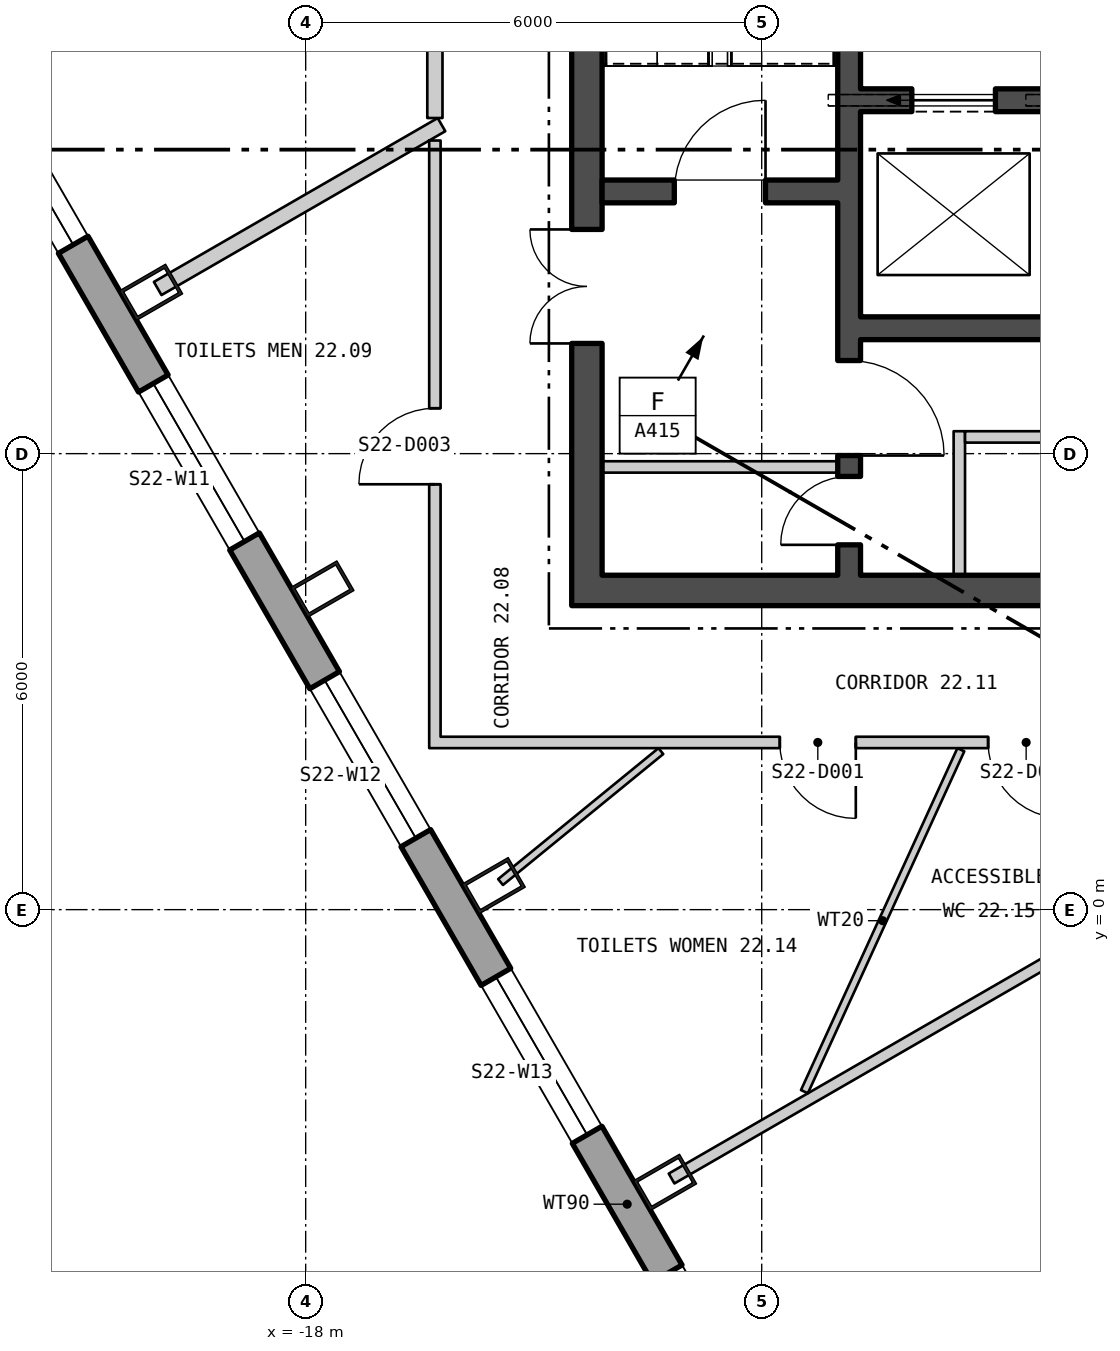
"""IFC4 building model, lengths in metres.
Left out: names, types, materials, properties, quantities, classifications, styles, units other than length and angle.
Written with IfcOpenShell. Run it as: python <this file> out.ifc"""

import sys

from ifc_helpers import new_model, si_unit, direction, frame, frame_2d, origin, origin_2d, place, context, subcontext, project, spatial, polyline, rectangle, hollow_rectangle, outline, extrude, element, fill, save


model = new_model("IFC4")
c1 = context("Model", 3, precision=1e-05, world=origin(), true_north=direction((0.0, 1.0)))
c2 = subcontext(c1, "Body", "Model", "MODEL_VIEW")
j1 = project(units=[si_unit("LENGTHUNIT", "METRE"), si_unit("PLANEANGLEUNIT", "RADIAN")], contexts=[c1])
p1 = place(None, origin())
s1 = spatial("IfcSite", under=j1, at=p1, CompositionType="ELEMENT")
p2 = place(p1, origin())
s2 = spatial("IfcBuilding", under=s1, at=p2, CompositionType="ELEMENT")
p3 = place(p2, frame((0.0, 0.0, 298.2)))
s3 = spatial("IfcBuildingStorey", under=s2, at=p3, CompositionType="ELEMENT", Elevation=298.2)
for number, where, z_axis, x_axis in (
    (1, (-20.034, 8.123, 0.0), (0.0, 0.0, 1.0), (0.5, -0.866, 0.0)),
    (2, (-17.78, 4.219, 0.0), (0.0, 0.0, 1.0), (0.5, -0.866, 0.0)),
    (3, (-15.526, 0.316, 0.0), (0.0, 0.0, 1.0), (0.5, -0.866, 0.0)),
    (4, (-13.272, -3.588, 0.0), (0.0, 0.0, 1.0), (0.5, -0.866, 0.0)),
):
    element("IfcColumn", number, at=place(p3, frame(where, z_axis=z_axis, x_axis=x_axis)), inside=s3, PredefinedType="COLUMN", context=c2, shape_type="SweptSolid", body=[
        extrude(hollow_rectangle(XDim=0.45, YDim=0.7, WallThickness=0.04, at=origin_2d()), origin(), (0.0, 0.0, 1.0), 6.0),
    ])
p4 = place(p3, frame((-25.205, 15.931, -0.28), z_axis=(0.0, 0.0, 1.0), x_axis=(0.499999764979, -0.866025539474, 0.0)))
e5 = element("IfcWall", 5, at=p4, inside=s3, PredefinedType="SOLIDWALL", context=c2, shape_type="SweptSolid", body=[
    extrude(outline(polyline([(-0.13, -0.225), (45.87, -0.225), (45.61, 0.225), (0.13, 0.225), (-0.13, -0.225)])), origin(), (0.0, 0.0, 1.0), 6.1),
])
p5 = place(p4, frame((1.424, 0.0, 1.18)))
e6 = element("IfcOpeningElement", 6, at=p5, cuts=e5, PredefinedType="OPENING", context=c2, shape_type="SweptSolid", body=[
    extrude(rectangle(XDim=2.4, YDim=4.1, at=frame_2d((1.2, 2.05))), frame((0.0, 0.235, 0.0), z_axis=(0.0, -1.0, 0.0), x_axis=(1.0, 0.0, 0.0)), (0.0, 0.0, 1.0), 0.47),
])
p6 = place(p4, frame((5.893, 0.0, 1.18)))
e7 = element("IfcOpeningElement", 7, at=p6, cuts=e5, PredefinedType="OPENING", context=c2, shape_type="SweptSolid", body=[
    extrude(rectangle(XDim=2.4, YDim=4.1, at=frame_2d((1.2, 2.05))), frame((0.0, 0.235, 0.0), z_axis=(0.0, -1.0, 0.0), x_axis=(1.0, 0.0, 0.0)), (0.0, 0.0, 1.0), 0.47),
])
p7 = place(p4, frame((10.401, 0.0, 1.18)))
e8 = element("IfcOpeningElement", 8, at=p7, cuts=e5, PredefinedType="OPENING", context=c2, shape_type="SweptSolid", body=[
    extrude(rectangle(XDim=2.4, YDim=4.1, at=frame_2d((1.2, 2.05))), frame((0.0, 0.235, 0.0), z_axis=(0.0, -1.0, 0.0), x_axis=(1.0, 0.0, 0.0)), (0.0, 0.0, 1.0), 0.47),
])
p8 = place(p4, frame((14.909, 0.0, 1.18)))
e9 = element("IfcOpeningElement", 9, at=p8, cuts=e5, PredefinedType="OPENING", context=c2, shape_type="SweptSolid", body=[
    extrude(rectangle(XDim=2.4, YDim=4.1, at=frame_2d((1.2, 2.05))), frame((0.0, 0.235, 0.0), z_axis=(0.0, -1.0, 0.0), x_axis=(1.0, 0.0, 0.0)), (0.0, 0.0, 1.0), 0.47),
])
p9 = place(p4, frame((19.416, 0.0, 1.18)))
e10 = element("IfcOpeningElement", 10, at=p9, cuts=e5, PredefinedType="OPENING", context=c2, shape_type="SweptSolid", body=[
    extrude(rectangle(XDim=2.4, YDim=4.1, at=frame_2d((1.2, 2.05))), frame((0.0, 0.235, 0.0), z_axis=(0.0, -1.0, 0.0), x_axis=(1.0, 0.0, 0.0)), (0.0, 0.0, 1.0), 0.47),
])
p10 = place(p4, frame((23.924, 0.0, 1.18)))
e11 = element("IfcOpeningElement", 11, at=p10, cuts=e5, PredefinedType="OPENING", context=c2, shape_type="SweptSolid", body=[
    extrude(rectangle(XDim=2.4, YDim=4.1, at=frame_2d((1.2, 2.05))), frame((0.0, 0.235, 0.0), z_axis=(0.0, -1.0, 0.0), x_axis=(1.0, 0.0, 0.0)), (0.0, 0.0, 1.0), 0.47),
])
p11 = place(p4, frame((28.431, 0.0, 1.18)))
e12 = element("IfcOpeningElement", 12, at=p11, cuts=e5, PredefinedType="OPENING", context=c2, shape_type="SweptSolid", body=[
    extrude(rectangle(XDim=2.4, YDim=4.1, at=frame_2d((1.2, 2.05))), frame((0.0, 0.235, 0.0), z_axis=(0.0, -1.0, 0.0), x_axis=(1.0, 0.0, 0.0)), (0.0, 0.0, 1.0), 0.47),
])
p12 = place(p4, frame((32.939, 0.0, 1.18)))
e13 = element("IfcOpeningElement", 13, at=p12, cuts=e5, PredefinedType="OPENING", context=c2, shape_type="SweptSolid", body=[
    extrude(rectangle(XDim=2.4, YDim=4.1, at=frame_2d((1.2, 2.05))), frame((0.0, 0.235, 0.0), z_axis=(0.0, -1.0, 0.0), x_axis=(1.0, 0.0, 0.0)), (0.0, 0.0, 1.0), 0.47),
])
p13 = place(p4, frame((37.447, 0.0, 1.18)))
e14 = element("IfcOpeningElement", 14, at=p13, cuts=e5, PredefinedType="OPENING", context=c2, shape_type="SweptSolid", body=[
    extrude(rectangle(XDim=2.4, YDim=4.1, at=frame_2d((1.2, 2.05))), frame((0.0, 0.235, 0.0), z_axis=(0.0, -1.0, 0.0), x_axis=(1.0, 0.0, 0.0)), (0.0, 0.0, 1.0), 0.47),
])
p14 = place(p4, frame((41.916, 0.0, 1.18)))
e15 = element("IfcOpeningElement", 15, at=p14, cuts=e5, PredefinedType="OPENING", context=c2, shape_type="SweptSolid", body=[
    extrude(rectangle(XDim=2.4, YDim=4.1, at=frame_2d((1.2, 2.05))), frame((0.0, 0.235, 0.0), z_axis=(0.0, -1.0, 0.0), x_axis=(1.0, 0.0, 0.0)), (0.0, 0.0, 1.0), 0.47),
])
p15 = place(p3, frame((-14.5, 4.2, 0.0), z_axis=(0.0, 0.0, 1.0), x_axis=(1.0, 0.0, 0.0)))
e16 = element("IfcWall", 16, at=p15, inside=s3, PredefinedType="SHEAR", context=c2, shape_type="SweptSolid", body=[
    extrude(rectangle(XDim=29.0, YDim=0.4, at=frame_2d((14.5, 0.0))), origin(), (0.0, 0.0, 1.0), 5.8),
])
p16 = place(p15, frame((9.0, 0.0, 0.0)))
e17 = element("IfcOpeningElement", 17, at=p16, cuts=e16, PredefinedType="OPENING", context=c2, shape_type="SweptSolid", body=[
    extrude(rectangle(XDim=1.8, YDim=2.4, at=frame_2d((0.9, 1.2))), frame((0.0, 0.21, 0.0), z_axis=(0.0, -1.0, 0.0), x_axis=(1.0, 0.0, 0.0)), (0.0, 0.0, 1.0), 0.42),
])
p17 = place(p15, frame((19.0, 0.0, 0.0)))
e18 = element("IfcOpeningElement", 18, at=p17, cuts=e16, PredefinedType="OPENING", context=c2, shape_type="SweptSolid", body=[
    extrude(rectangle(XDim=1.8, YDim=2.4, at=frame_2d((0.9, 1.2))), frame((0.0, 0.21, 0.0), z_axis=(0.0, -1.0, 0.0), x_axis=(1.0, 0.0, 0.0)), (0.0, 0.0, 1.0), 0.42),
])
p18 = place(p3, frame((-14.3, 4.4, 0.0), z_axis=(0.0, 0.0, 1.0), x_axis=(0.0, 1.0, 0.0)))
e19 = element("IfcWall", 19, at=p18, inside=s3, PredefinedType="SHEAR", context=c2, shape_type="SweptSolid", body=[
    extrude(rectangle(XDim=13.2, YDim=0.4, at=frame_2d((6.6, 0.0))), origin(), (0.0, 0.0, 1.0), 5.8),
])
p19 = place(p18, frame((3.05, 0.0, 0.0)))
e20 = element("IfcOpeningElement", 20, at=p19, cuts=e19, PredefinedType="OPENING", context=c2, shape_type="SweptSolid", body=[
    extrude(rectangle(XDim=1.5, YDim=2.1, at=frame_2d((0.75, 1.05))), frame((0.0, 0.21, 0.0), z_axis=(0.0, -1.0, 0.0), x_axis=(1.0, 0.0, 0.0)), (0.0, 0.0, 1.0), 0.42),
])
p20 = place(p3, frame((-10.85, 4.4, 0.0), z_axis=(0.0, 0.0, 1.0), x_axis=(0.0, 1.0, 0.0)))
e21 = element("IfcWall", 21, at=p20, inside=s3, PredefinedType="SHEAR", context=c2, shape_type="SweptSolid", body=[
    extrude(rectangle(XDim=13.2, YDim=0.3, at=frame_2d((6.6, 0.0))), origin(), (0.0, 0.0, 1.0), 5.8),
])
p21 = place(p20, frame((1.575, 0.0, 0.0)))
e22 = element("IfcOpeningElement", 22, at=p21, cuts=e21, PredefinedType="OPENING", context=c2, shape_type="SweptSolid", body=[
    extrude(rectangle(XDim=1.25, YDim=2.1, at=frame_2d((0.625, 1.05))), frame((0.0, 0.16, 0.0), z_axis=(0.0, -1.0, 0.0), x_axis=(1.0, 0.0, 0.0)), (0.0, 0.0, 1.0), 0.32),
])
p22 = place(p20, frame((0.4, 0.0, 0.0)))
e23 = element("IfcOpeningElement", 23, at=p22, cuts=e21, PredefinedType="OPENING", context=c2, shape_type="SweptSolid", body=[
    extrude(rectangle(XDim=0.9, YDim=2.1, at=frame_2d((0.45, 1.05))), frame((0.0, 0.16, 0.0), z_axis=(0.0, -1.0, 0.0), x_axis=(1.0, 0.0, 0.0)), (0.0, 0.0, 1.0), 0.32),
])
p23 = place(p3, frame((-14.1, 9.45, 0.0), z_axis=(0.0, 0.0, 1.0), x_axis=(1.0, 0.0, 0.0)))
e24 = element("IfcWall", 24, at=p23, inside=s3, PredefinedType="SHEAR", context=c2, shape_type="SweptSolid", body=[
    extrude(rectangle(XDim=3.1, YDim=0.3, at=frame_2d((1.55, 0.0))), origin(), (0.0, 0.0, 1.0), 5.8),
])
p24 = place(p23, frame((0.95, 0.0, 0.0)))
e25 = element("IfcOpeningElement", 25, at=p24, cuts=e24, PredefinedType="OPENING", context=c2, shape_type="SweptSolid", body=[
    extrude(rectangle(XDim=1.2, YDim=2.1, at=frame_2d((0.6, 1.05))), frame((0.0, 0.16, 0.0), z_axis=(0.0, -1.0, 0.0), x_axis=(1.0, 0.0, 0.0)), (0.0, 0.0, 1.0), 0.32),
])
p25 = place(p3, frame((-10.7, 10.65, 0.0), z_axis=(0.0, 0.0, 1.0), x_axis=(1.0, 0.0, 0.0)))
e26 = element("IfcWall", 26, at=p25, inside=s3, PredefinedType="SHEAR", context=c2, shape_type="SweptSolid", body=[
    extrude(rectangle(XDim=10.3, YDim=0.3, at=frame_2d((5.15, 0.0))), origin(), (0.0, 0.0, 1.0), 5.8),
])
p26 = place(p25, frame((0.675, 0.0, 0.0)))
e27 = element("IfcOpeningElement", 27, at=p26, cuts=e26, PredefinedType="OPENING", context=c2, shape_type="SweptSolid", body=[
    extrude(rectangle(XDim=1.1, YDim=2.1, at=frame_2d((0.55, 1.05))), frame((0.0, 0.16, 0.0), z_axis=(0.0, -1.0, 0.0), x_axis=(1.0, 0.0, 0.0)), (0.0, 0.0, 1.0), 0.32),
])
p27 = place(p25, frame((3.275, 0.0, 0.0)))
e28 = element("IfcOpeningElement", 28, at=p27, cuts=e26, PredefinedType="OPENING", context=c2, shape_type="SweptSolid", body=[
    extrude(rectangle(XDim=1.1, YDim=2.1, at=frame_2d((0.55, 1.05))), frame((0.0, 0.16, 0.0), z_axis=(0.0, -1.0, 0.0), x_axis=(1.0, 0.0, 0.0)), (0.0, 0.0, 1.0), 0.32),
])
p28 = place(p25, frame((5.825, 0.0, 0.0)))
e29 = element("IfcOpeningElement", 29, at=p28, cuts=e26, PredefinedType="OPENING", context=c2, shape_type="SweptSolid", body=[
    extrude(rectangle(XDim=1.1, YDim=2.1, at=frame_2d((0.55, 1.05))), frame((0.0, 0.16, 0.0), z_axis=(0.0, -1.0, 0.0), x_axis=(1.0, 0.0, 0.0)), (0.0, 0.0, 1.0), 0.32),
])
p29 = place(p25, frame((8.425, 0.0, 0.0)))
e30 = element("IfcOpeningElement", 30, at=p29, cuts=e26, PredefinedType="OPENING", context=c2, shape_type="SweptSolid", body=[
    extrude(rectangle(XDim=1.0, YDim=2.1, at=frame_2d((0.5, 1.05))), frame((0.0, 0.16, 0.0), z_axis=(0.0, -1.0, 0.0), x_axis=(1.0, 0.0, 0.0)), (0.0, 0.0, 1.0), 0.32),
])
p30 = place(p3, frame((-10.7, 7.65, 0.0), z_axis=(0.0, 0.0, 1.0), x_axis=(1.0, 0.0, 0.0)))
e31 = element("IfcWall", 31, at=p30, inside=s3, PredefinedType="SHEAR", context=c2, shape_type="SweptSolid", body=[
    extrude(rectangle(XDim=10.3, YDim=0.3, at=frame_2d((5.15, 0.0))), origin(), (0.0, 0.0, 1.0), 5.8),
])
p31 = place(p3, frame((-14.1, 5.825, 0.0), z_axis=(0.0, 0.0, 1.0), x_axis=(1.0, 0.0, 0.0)))
e32 = element("IfcWall", 32, at=p31, inside=s3, PredefinedType="PARTITIONING", context=c2, shape_type="SweptSolid", body=[
    extrude(rectangle(XDim=3.1, YDim=0.15, at=frame_2d((1.55, 0.0))), origin(), (0.0, 0.0, 1.0), 5.8),
])
p32 = place(p3, frame((-9.4, 4.4, 0.0), z_axis=(0.0, 0.0, 1.0), x_axis=(0.0, 1.0, 0.0)))
e33 = element("IfcWall", 33, at=p32, inside=s3, PredefinedType="PARTITIONING", context=c2, shape_type="SweptSolid", body=[
    extrude(rectangle(XDim=1.895, YDim=0.15, at=frame_2d((0.948, 0.0))), origin(), (0.0, 0.0, 1.0), 5.8),
])
p33 = place(p3, frame((-9.325, 6.22, 0.0), z_axis=(0.0, 0.0, 1.0), x_axis=(1.0, 0.0, 0.0)))
e34 = element("IfcWall", 34, at=p33, inside=s3, PredefinedType="PARTITIONING", context=c2, shape_type="SweptSolid", body=[
    extrude(rectangle(XDim=3.3, YDim=0.15, at=frame_2d((1.65, 0.0))), origin(), (0.0, 0.0, 1.0), 5.8),
])
p34 = place(p33, frame((1.2, 0.0, 0.0)))
e35 = element("IfcOpeningElement", 35, at=p34, cuts=e34, PredefinedType="OPENING", context=c2, shape_type="SweptSolid", body=[
    extrude(rectangle(XDim=0.9, YDim=2.1, at=frame_2d((0.45, 1.05))), frame((0.0, 0.085, 0.0), z_axis=(0.0, -1.0, 0.0), x_axis=(1.0, 0.0, 0.0)), (0.0, 0.0, 1.0), 0.17),
])
p35 = place(p3, frame((-19.947, 8.173, 0.0), z_axis=(0.0, 0.0, 1.0), x_axis=(0.866007919525, 0.500030282404, 0.0)))
e36 = element("IfcWall", 36, at=p35, inside=s3, PredefinedType="PARTITIONING", context=c2, shape_type="SweptSolid", body=[
    extrude(rectangle(XDim=4.312, YDim=0.2, at=frame_2d((2.156, 0.0))), origin(), (0.0, 0.0, 1.0), 5.8),
])
p36 = place(p3, frame((-16.375, 2.2, 0.0), z_axis=(0.0, 0.0, 1.0), x_axis=(1.0, 0.0, 0.0)))
e37 = element("IfcWall", 37, at=p36, inside=s3, PredefinedType="PARTITIONING", context=c2, shape_type="SweptSolid", body=[
    extrude(rectangle(XDim=8.67, YDim=0.15, at=frame_2d((4.335, 0.0))), origin(), (0.0, 0.0, 1.0), 5.8),
])
p37 = place(p36, frame((4.613, 0.0, 0.0)))
e38 = element("IfcOpeningElement", 38, at=p37, cuts=e37, PredefinedType="OPENING", context=c2, shape_type="SweptSolid", body=[
    extrude(rectangle(XDim=1.0, YDim=2.1, at=frame_2d((0.5, 1.05))), frame((0.0, 0.085, 0.0), z_axis=(0.0, -1.0, 0.0), x_axis=(1.0, 0.0, 0.0)), (0.0, 0.0, 1.0), 0.17),
])
p38 = place(p36, frame((7.354, 0.0, 0.0)))
e39 = element("IfcOpeningElement", 39, at=p38, cuts=e37, PredefinedType="OPENING", context=c2, shape_type="SweptSolid", body=[
    extrude(rectangle(XDim=1.0, YDim=2.1, at=frame_2d((0.5, 1.05))), frame((0.0, 0.085, 0.0), z_axis=(0.0, -1.0, 0.0), x_axis=(1.0, 0.0, 0.0)), (0.0, 0.0, 1.0), 0.17),
])
p39 = place(p3, frame((-16.3, 2.275, 0.0), z_axis=(0.0, 0.0, 1.0), x_axis=(0.0, 1.0, 0.0)))
e40 = element("IfcWall", 40, at=p39, inside=s3, PredefinedType="PARTITIONING", context=c2, shape_type="SweptSolid", body=[
    extrude(rectangle(XDim=7.845, YDim=0.15, at=frame_2d((3.922, 0.0))), origin(), (0.0, 0.0, 1.0), 5.8),
])
p40 = place(p39, frame((3.322, 0.0, 0.0)))
e41 = element("IfcOpeningElement", 41, at=p40, cuts=e40, PredefinedType="OPENING", context=c2, shape_type="SweptSolid", body=[
    extrude(rectangle(XDim=1.0, YDim=2.1, at=frame_2d((0.5, 1.05))), frame((0.0, 0.085, 0.0), z_axis=(0.0, -1.0, 0.0), x_axis=(1.0, 0.0, 0.0)), (0.0, 0.0, 1.0), 0.17),
])
p41 = place(p3, frame((-16.3, 10.416, 0.0), z_axis=(0.0, 0.0, 1.0), x_axis=(0.0, 1.0, 0.0)))
e42 = element("IfcWall", 42, at=p41, inside=s3, PredefinedType="PARTITIONING", context=c2, shape_type="SweptSolid", body=[
    extrude(rectangle(XDim=3.069, YDim=0.2, at=frame_2d((1.534, 0.0))), origin(), (0.0, 0.0, 1.0), 5.8),
])
p42 = place(p41, frame((1.059, 0.0, 0.0)))
e43 = element("IfcOpeningElement", 43, at=p42, cuts=e42, PredefinedType="OPENING", context=c2, shape_type="SweptSolid", body=[
    extrude(rectangle(XDim=0.9, YDim=2.1, at=frame_2d((0.45, 1.05))), frame((0.0, 0.11, 0.0), z_axis=(0.0, -1.0, 0.0), x_axis=(1.0, 0.0, 0.0)), (0.0, 0.0, 1.0), 0.22),
])
p43 = place(p3, frame((-15.436, 0.363, 0.0), z_axis=(0.0, 0.0, 1.0), x_axis=(0.774415182093, 0.632677742412, 0.0)))
e44 = element("IfcWall", 44, at=p43, inside=s3, PredefinedType="PARTITIONING", context=c2, shape_type="SweptSolid", body=[
    extrude(rectangle(XDim=2.723, YDim=0.1, at=frame_2d((1.362, 0.0))), origin(), (0.0, 0.0, 1.0), 5.8),
])
p44 = place(p3, frame((-13.186, -3.538, 0.0), z_axis=(0.0, 0.0, 1.0), x_axis=(0.866100818307, 0.499869355459, 0.0)))
e45 = element("IfcWall", 45, at=p44, inside=s3, PredefinedType="PARTITIONING", context=c2, shape_type="SweptSolid", body=[
    extrude(rectangle(XDim=6.286, YDim=0.15, at=frame_2d((3.143, 0.0))), origin(), (0.0, 0.0, 1.0), 5.8),
])
p45 = place(p3, frame((-11.438, -2.395, 0.0), z_axis=(0.0, 0.0, 1.0), x_axis=(0.415979482181, 0.909373999191, 0.0)))
e46 = element("IfcWall", 46, at=p45, inside=s3, PredefinedType="PARTITIONING", context=c2, shape_type="SweptSolid", body=[
    extrude(rectangle(XDim=4.947, YDim=0.1, at=frame_2d((2.474, 0.0))), origin(), (0.0, 0.0, 1.0), 5.8),
])
p46 = place(p6, origin())
e47 = element("IfcWindow", 47, at=p46, inside=s3, PartitioningType="SINGLE_PANEL", PredefinedType="WINDOW", context=c2, shape_type="SweptSolid", body=[
    extrude(rectangle(XDim=2.4, YDim=4.1, at=frame_2d((1.2, 2.05))), frame((0.0, 0.105, 0.0), z_axis=(0.0, -1.0, 0.0), x_axis=(1.0, 0.0, 0.0)), (0.0, 0.0, 1.0), 0.06),
])
fill(e7, e47)
p47 = place(p7, origin())
e48 = element("IfcWindow", 48, at=p47, inside=s3, PartitioningType="SINGLE_PANEL", PredefinedType="WINDOW", context=c2, shape_type="SweptSolid", body=[
    extrude(rectangle(XDim=2.4, YDim=4.1, at=frame_2d((1.2, 2.05))), frame((0.0, 0.105, 0.0), z_axis=(0.0, -1.0, 0.0), x_axis=(1.0, 0.0, 0.0)), (0.0, 0.0, 1.0), 0.06),
])
fill(e8, e48)
p48 = place(p8, origin())
e49 = element("IfcWindow", 49, at=p48, inside=s3, PartitioningType="SINGLE_PANEL", PredefinedType="WINDOW", context=c2, shape_type="SweptSolid", body=[
    extrude(rectangle(XDim=2.4, YDim=4.1, at=frame_2d((1.2, 2.05))), frame((0.0, 0.105, 0.0), z_axis=(0.0, -1.0, 0.0), x_axis=(1.0, 0.0, 0.0)), (0.0, 0.0, 1.0), 0.06),
])
fill(e9, e49)
p49 = place(p9, origin())
e50 = element("IfcWindow", 50, at=p49, inside=s3, PartitioningType="SINGLE_PANEL", PredefinedType="WINDOW", context=c2, shape_type="SweptSolid", body=[
    extrude(rectangle(XDim=2.4, YDim=4.1, at=frame_2d((1.2, 2.05))), frame((0.0, 0.105, 0.0), z_axis=(0.0, -1.0, 0.0), x_axis=(1.0, 0.0, 0.0)), (0.0, 0.0, 1.0), 0.06),
])
fill(e10, e50)
p50 = place(p10, origin())
e51 = element("IfcWindow", 51, at=p50, inside=s3, PartitioningType="SINGLE_PANEL", PredefinedType="WINDOW", context=c2, shape_type="SweptSolid", body=[
    extrude(rectangle(XDim=2.4, YDim=4.1, at=frame_2d((1.2, 2.05))), frame((0.0, 0.105, 0.0), z_axis=(0.0, -1.0, 0.0), x_axis=(1.0, 0.0, 0.0)), (0.0, 0.0, 1.0), 0.06),
])
fill(e11, e51)
p51 = place(p26, origin())
e52 = element("IfcDoor", 52, at=p51, inside=s3, OperationType="SLIDING_TO_LEFT", PredefinedType="DOOR", context=c2, shape_type="SweptSolid", body=[
    extrude(rectangle(XDim=1.1, YDim=2.1, at=frame_2d((0.55, 1.05))), frame((0.0, 0.025, 0.0), z_axis=(0.0, -1.0, 0.0), x_axis=(1.0, 0.0, 0.0)), (0.0, 0.0, 1.0), 0.05),
])
fill(e27, e52)
p52 = place(p24, origin())
e53 = element("IfcDoor", 53, at=p52, inside=s3, OperationType="SINGLE_SWING_LEFT", PredefinedType="DOOR", context=c2, shape_type="SweptSolid", body=[
    extrude(rectangle(XDim=1.2, YDim=2.1, at=frame_2d((0.6, 1.05))), frame((0.0, 0.025, 0.0), z_axis=(0.0, -1.0, 0.0), x_axis=(1.0, 0.0, 0.0)), (0.0, 0.0, 1.0), 0.05),
])
fill(e25, e53)
p53 = place(p21, origin())
e54 = element("IfcDoor", 54, at=p53, inside=s3, OperationType="SINGLE_SWING_LEFT", PredefinedType="DOOR", context=c2, shape_type="SweptSolid", body=[
    extrude(rectangle(XDim=1.25, YDim=2.1, at=frame_2d((0.625, 1.05))), frame((0.0, 0.025, 0.0), z_axis=(0.0, -1.0, 0.0), x_axis=(1.0, 0.0, 0.0)), (0.0, 0.0, 1.0), 0.05),
])
fill(e22, e54)
p54 = place(p19, origin())
e55 = element("IfcDoor", 55, at=p54, inside=s3, OperationType="DOUBLE_DOOR_SINGLE_SWING", PredefinedType="DOOR", context=c2, shape_type="SweptSolid", body=[
    extrude(rectangle(XDim=1.5, YDim=2.1, at=frame_2d((0.75, 1.05))), frame((0.0, 0.025, 0.0), z_axis=(0.0, -1.0, 0.0), x_axis=(1.0, 0.0, 0.0)), (0.0, 0.0, 1.0), 0.05),
])
fill(e20, e55)
p55 = place(p22, origin())
e56 = element("IfcDoor", 56, at=p55, inside=s3, OperationType="SINGLE_SWING_RIGHT", PredefinedType="DOOR", context=c2, shape_type="SweptSolid", body=[
    extrude(rectangle(XDim=0.9, YDim=2.1, at=frame_2d((0.45, 1.05))), frame((0.0, 0.025, 0.0), z_axis=(0.0, -1.0, 0.0), x_axis=(1.0, 0.0, 0.0)), (0.0, 0.0, 1.0), 0.05),
])
fill(e23, e56)
p56 = place(p37, origin())
e57 = element("IfcDoor", 57, at=p56, inside=s3, OperationType="SINGLE_SWING_RIGHT", PredefinedType="DOOR", context=c2, shape_type="SweptSolid", body=[
    extrude(rectangle(XDim=1.0, YDim=2.1, at=frame_2d((0.5, 1.05))), frame((0.0, 0.025, 0.0), z_axis=(0.0, -1.0, 0.0), x_axis=(1.0, 0.0, 0.0)), (0.0, 0.0, 1.0), 0.05),
])
fill(e38, e57)
p57 = place(p38, origin())
e58 = element("IfcDoor", 58, at=p57, inside=s3, OperationType="SINGLE_SWING_RIGHT", PredefinedType="DOOR", context=c2, shape_type="SweptSolid", body=[
    extrude(rectangle(XDim=1.0, YDim=2.1, at=frame_2d((0.5, 1.05))), frame((0.0, 0.025, 0.0), z_axis=(0.0, -1.0, 0.0), x_axis=(1.0, 0.0, 0.0)), (0.0, 0.0, 1.0), 0.05),
])
fill(e39, e58)
p58 = place(p40, origin())
e59 = element("IfcDoor", 59, at=p58, inside=s3, OperationType="SINGLE_SWING_RIGHT", PredefinedType="DOOR", context=c2, shape_type="SweptSolid", body=[
    extrude(rectangle(XDim=1.0, YDim=2.1, at=frame_2d((0.5, 1.05))), frame((0.0, 0.025, 0.0), z_axis=(0.0, -1.0, 0.0), x_axis=(1.0, 0.0, 0.0)), (0.0, 0.0, 1.0), 0.05),
])
fill(e41, e59)
save(model, sys.argv[1])
